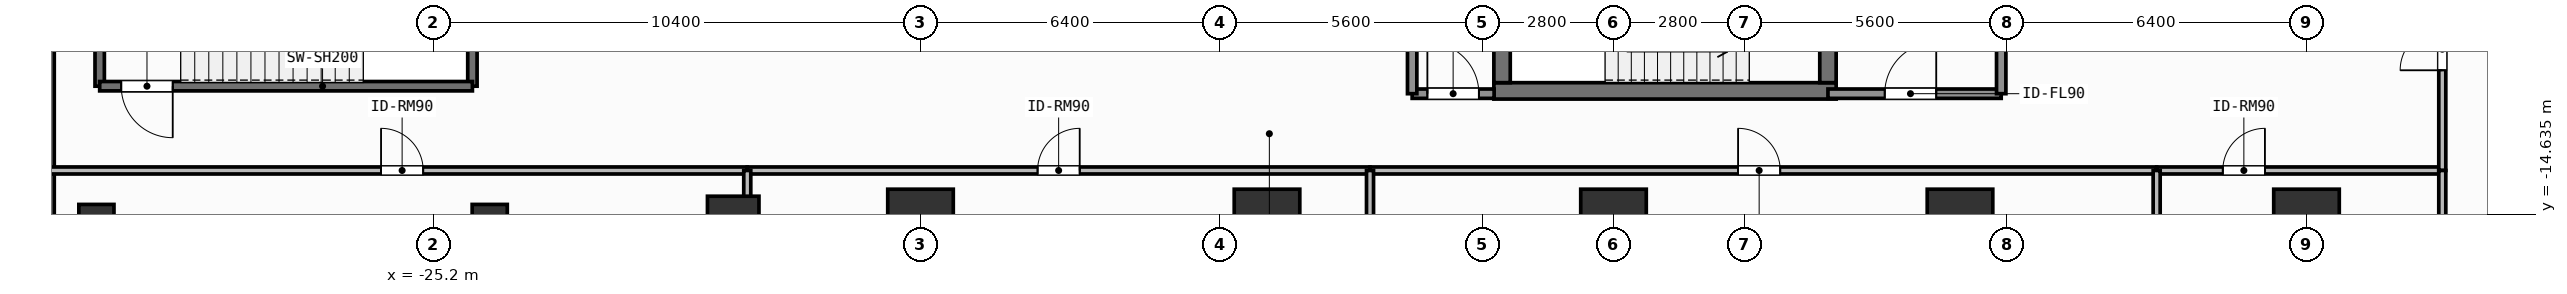
"""IFC4 building model, lengths in metres.
Left out: names, types, materials, properties, quantities, classifications, styles, units other than length and angle.
Written with IfcOpenShell. Run it as: python <this file> out.ifc"""

import sys

from ifc_helpers import new_model, si_unit, direction, frame, frame_2d, origin, origin_2d, place, context, subcontext, project, spatial, rectangle, extrude, element, fill, save


model = new_model("IFC4")
c1 = context("Model", 3, precision=1e-05, world=origin(), true_north=direction((0.0, 1.0)))
c2 = subcontext(c1, "Body", "Model", "MODEL_VIEW")
j1 = project(units=[si_unit("LENGTHUNIT", "METRE"), si_unit("PLANEANGLEUNIT", "RADIAN")], contexts=[c1])
p1 = place(None, origin())
s1 = spatial("IfcSite", under=j1, at=p1, CompositionType="ELEMENT")
p2 = place(p1, origin())
s2 = spatial("IfcBuilding", under=s1, at=p2, CompositionType="ELEMENT")
p3 = place(p2, frame((0.0, 0.0, 4.8)))
s3 = spatial("IfcBuildingStorey", under=s2, at=p3, CompositionType="ELEMENT", Elevation=4.8)
p4 = place(p3, frame((-2.555, -12.0, 0.0), z_axis=(0.0, 0.0, 1.0), x_axis=(1.0, 0.0, 0.0)))
e1 = element("IfcWall", 1, at=p4, inside=s3, PredefinedType="SHEAR", context=c2, shape_type="SweptSolid", body=[
    extrude(rectangle(XDim=7.31, YDim=0.35, at=frame_2d((3.655, 0.0))), origin(), (0.0, 0.0, 1.0), 4.2),
])
p5 = place(p3, frame((-2.38, -11.825, 0.0), z_axis=(0.0, 0.0, 1.0), x_axis=(0.0, 1.0, 0.0)))
e2 = element("IfcWall", 2, at=p5, inside=s3, PredefinedType="SHEAR", context=c2, shape_type="SweptSolid", body=[
    extrude(rectangle(XDim=2.925, YDim=0.35, at=frame_2d((1.462, 0.0))), origin(), (0.0, 0.0, 1.0), 4.2),
])
p6 = place(p3, frame((4.58, -8.9, 0.0), z_axis=(0.0, 0.0, 1.0), x_axis=(0.0, -1.0, 0.0)))
e3 = element("IfcWall", 3, at=p6, inside=s3, PredefinedType="SHEAR", context=c2, shape_type="SweptSolid", body=[
    extrude(rectangle(XDim=2.925, YDim=0.35, at=frame_2d((1.462, 0.0))), origin(), (0.0, 0.0, 1.0), 4.2),
])
p7 = place(p6, frame((0.913, 0.0, 0.0)))
e4 = element("IfcOpeningElement", 4, at=p7, cuts=e3, PredefinedType="OPENING", context=c2, shape_type="SweptSolid", body=[
    extrude(rectangle(XDim=1.1, YDim=2.15, at=frame_2d((0.55, 1.075))), frame((0.0, 0.185, 0.0), z_axis=(0.0, -1.0, 0.0), x_axis=(1.0, 0.0, 0.0)), (0.0, 0.0, 1.0), 0.37),
])
for number, where, z_axis, x_axis in (
    (5, (-14.8, -14.8, 0.0), (0.0, 0.0, 1.0), (1.0, 0.0, 0.0)),
    (6, (-7.4, -14.8, 0.0), (0.0, 0.0, 1.0), (1.0, 0.0, 0.0)),
    (7, (0.0, -14.8, 0.0), (0.0, 0.0, 1.0), (1.0, 0.0, 0.0)),
    (8, (7.4, -14.8, 0.0), (0.0, 0.0, 1.0), (1.0, 0.0, 0.0)),
    (9, (14.8, -14.8, 0.0), (0.0, 0.0, 1.0), (1.0, 0.0, 0.0)),
):
    element("IfcColumn", number, at=place(p3, frame(where, z_axis=z_axis, x_axis=x_axis)), inside=s3, PredefinedType="COLUMN", context=c2, shape_type="SweptSolid", body=[
        extrude(rectangle(XDim=1.4, YDim=1.4, at=origin_2d()), origin(), (0.0, 0.0, 1.0), 4.2),
    ])
p8 = place(p3, frame((-18.8, -14.8, 0.0), z_axis=(0.0, 0.0, 1.0), x_axis=(1.0, 0.0, 0.0)))
e10 = element("IfcColumn", 10, at=p8, inside=s3, PredefinedType="COLUMN", context=c2, shape_type="SweptSolid", body=[
    extrude(rectangle(XDim=1.1, YDim=1.1, at=origin_2d()), origin(), (0.0, 0.0, 1.0), 4.2),
])
for number, where, z_axis, x_axis in (
    (11, (-32.4, -14.8, 0.0), (0.0, 0.0, 1.0), (1.0, 0.0, 0.0)),
    (12, (-24.0, -14.8, 0.0), (0.0, 0.0, 1.0), (1.0, 0.0, 0.0)),
):
    element("IfcColumn", number, at=place(p3, frame(where, z_axis=z_axis, x_axis=x_axis)), inside=s3, PredefinedType="COLUMN", context=c2, shape_type="SweptSolid", body=[
        extrude(rectangle(XDim=0.75, YDim=0.75, at=origin_2d()), origin(), (0.0, 0.0, 1.0), 4.2),
    ])
p9 = place(p3, frame((-33.45, -20.5, 0.0), z_axis=(0.0, 0.0, 1.0), x_axis=(0.0, 1.0, 0.0)))
e13 = element("IfcWall", 13, at=p9, inside=s3, PredefinedType="SOLIDWALL", context=c2, shape_type="SweptSolid", body=[
    extrude(rectangle(XDim=14.09, YDim=0.3, at=frame_2d((7.045, 0.0))), origin(), (0.0, 0.0, 1.0), 3.96),
])
for number, where, z_axis, x_axis in (
    (14, (-32.33, -11.9, 0.0), (0.0, 0.0, 1.0), (0.0, 1.0, 0.0)),
    (15, (-24.37, -8.48, 0.0), (0.0, 0.0, 1.0), (0.0, -1.0, 0.0)),
):
    element("IfcWall", number, at=place(p3, frame(where, z_axis=z_axis, x_axis=x_axis)), inside=s3, PredefinedType="SHEAR", context=c2, shape_type="SweptSolid", body=[
        extrude(rectangle(XDim=3.42, YDim=0.2, at=frame_2d((1.71, 0.0))), origin(), (0.0, 0.0, 1.0), 3.96),
    ])
p10 = place(p3, frame((-24.37, -11.9, 0.0), z_axis=(0.0, 0.0, 1.0), x_axis=(-1.0, 0.0, 0.0)))
e16 = element("IfcWall", 16, at=p10, inside=s3, PredefinedType="SHEAR", context=c2, shape_type="SweptSolid", body=[
    extrude(rectangle(XDim=7.96, YDim=0.2, at=frame_2d((3.98, 0.0))), origin(), (0.0, 0.0, 1.0), 3.96),
])
p11 = place(p10, frame((6.4, 0.0, 0.0)))
e17 = element("IfcOpeningElement", 17, at=p11, cuts=e16, PredefinedType="OPENING", context=c2, shape_type="SweptSolid", body=[
    extrude(rectangle(XDim=1.1, YDim=2.15, at=frame_2d((0.55, 1.075))), frame((0.0, 0.11, 0.0), z_axis=(0.0, -1.0, 0.0), x_axis=(1.0, 0.0, 0.0)), (0.0, 0.0, 1.0), 0.22),
])
p12 = place(p3, frame((4.58, -12.06, 0.0), z_axis=(0.0, 0.0, 1.0), x_axis=(1.0, 0.0, 0.0)))
e18 = element("IfcWall", 18, at=p12, inside=s3, PredefinedType="SOLIDWALL", context=c2, shape_type="SweptSolid", body=[
    extrude(rectangle(XDim=3.7, YDim=0.2, at=frame_2d((1.85, 0.0))), origin(), (0.0, 0.0, 1.0), 3.96),
])
p13 = place(p12, frame((1.212, 0.0, 0.0)))
e19 = element("IfcOpeningElement", 19, at=p13, cuts=e18, PredefinedType="OPENING", context=c2, shape_type="SweptSolid", body=[
    extrude(rectangle(XDim=1.1, YDim=2.15, at=frame_2d((0.55, 1.075))), frame((0.0, 0.11, 0.0), z_axis=(0.0, -1.0, 0.0), x_axis=(1.0, 0.0, 0.0)), (0.0, 0.0, 1.0), 0.22),
])
p14 = place(p3, frame((-4.3, -12.06, 0.0), z_axis=(0.0, 0.0, 1.0), x_axis=(1.0, 0.0, 0.0)))
e20 = element("IfcWall", 20, at=p14, inside=s3, PredefinedType="SOLIDWALL", context=c2, shape_type="SweptSolid", body=[
    extrude(rectangle(XDim=1.75, YDim=0.2, at=frame_2d((0.875, 0.0))), origin(), (0.0, 0.0, 1.0), 3.96),
])
p15 = place(p14, frame((0.325, 0.0, 0.0)))
e21 = element("IfcOpeningElement", 21, at=p15, cuts=e20, PredefinedType="OPENING", context=c2, shape_type="SweptSolid", body=[
    extrude(rectangle(XDim=1.1, YDim=2.15, at=frame_2d((0.55, 1.075))), frame((0.0, 0.11, 0.0), z_axis=(0.0, -1.0, 0.0), x_axis=(1.0, 0.0, 0.0)), (0.0, 0.0, 1.0), 0.22),
])
p16 = place(p3, frame((-33.42, -13.7, 0.0), z_axis=(0.0, 0.0, 1.0), x_axis=(1.0, 0.0, 0.0)))
e22 = element("IfcWall", 22, at=p16, inside=s3, PredefinedType="PARTITIONING", context=c2, shape_type="SweptSolid", body=[
    extrude(rectangle(XDim=14.92, YDim=0.15, at=frame_2d((7.46, 0.0))), origin(), (0.0, 0.0, 1.0), 3.96),
])
p17 = place(p16, frame((7.099, 0.0, 0.0)))
e23 = element("IfcOpeningElement", 23, at=p17, cuts=e22, PredefinedType="OPENING", context=c2, shape_type="SweptSolid", body=[
    extrude(rectangle(XDim=0.9, YDim=2.1, at=frame_2d((0.45, 1.05))), frame((0.0, 0.085, 0.0), z_axis=(0.0, -1.0, 0.0), x_axis=(1.0, 0.0, 0.0)), (0.0, 0.0, 1.0), 0.17),
])
p18 = place(p3, frame((-18.5, -13.7, 0.0), z_axis=(0.0, 0.0, 1.0), x_axis=(1.0, 0.0, 0.0)))
e24 = element("IfcWall", 24, at=p18, inside=s3, PredefinedType="PARTITIONING", context=c2, shape_type="SweptSolid", body=[
    extrude(rectangle(XDim=13.3, YDim=0.15, at=frame_2d((6.65, 0.0))), origin(), (0.0, 0.0, 1.0), 3.96),
])
p19 = place(p18, frame((6.2, 0.0, 0.0)))
e25 = element("IfcOpeningElement", 25, at=p19, cuts=e24, PredefinedType="OPENING", context=c2, shape_type="SweptSolid", body=[
    extrude(rectangle(XDim=0.9, YDim=2.1, at=frame_2d((0.45, 1.05))), frame((0.0, 0.085, 0.0), z_axis=(0.0, -1.0, 0.0), x_axis=(1.0, 0.0, 0.0)), (0.0, 0.0, 1.0), 0.17),
])
p20 = place(p3, frame((-5.2, -13.7, 0.0), z_axis=(0.0, 0.0, 1.0), x_axis=(1.0, 0.0, 0.0)))
e26 = element("IfcWall", 26, at=p20, inside=s3, PredefinedType="PARTITIONING", context=c2, shape_type="SweptSolid", body=[
    extrude(rectangle(XDim=16.8, YDim=0.15, at=frame_2d((8.4, 0.0))), origin(), (0.0, 0.0, 1.0), 3.96),
])
p21 = place(p20, frame((7.861, 0.0, 0.0)))
e27 = element("IfcOpeningElement", 27, at=p21, cuts=e26, PredefinedType="OPENING", context=c2, shape_type="SweptSolid", body=[
    extrude(rectangle(XDim=0.9, YDim=2.1, at=frame_2d((0.45, 1.05))), frame((0.0, 0.085, 0.0), z_axis=(0.0, -1.0, 0.0), x_axis=(1.0, 0.0, 0.0)), (0.0, 0.0, 1.0), 0.17),
])
p22 = place(p3, frame((11.6, -13.7, 0.0), z_axis=(0.0, 0.0, 1.0), x_axis=(1.0, 0.0, 0.0)))
e28 = element("IfcWall", 28, at=p22, inside=s3, PredefinedType="PARTITIONING", context=c2, shape_type="SweptSolid", body=[
    extrude(rectangle(XDim=6.05, YDim=0.15, at=frame_2d((3.025, 0.0))), origin(), (0.0, 0.0, 1.0), 3.96),
])
p23 = place(p22, frame((1.412, 0.0, 0.0)))
e29 = element("IfcOpeningElement", 29, at=p23, cuts=e28, PredefinedType="OPENING", context=c2, shape_type="SweptSolid", body=[
    extrude(rectangle(XDim=0.9, YDim=2.1, at=frame_2d((0.45, 1.05))), frame((0.0, 0.085, 0.0), z_axis=(0.0, -1.0, 0.0), x_axis=(1.0, 0.0, 0.0)), (0.0, 0.0, 1.0), 0.17),
])
p24 = place(p3, frame((17.7, -13.7, 0.0), z_axis=(0.0, 0.0, 1.0), x_axis=(0.0, 1.0, 0.0)))
e30 = element("IfcWall", 30, at=p24, inside=s3, PredefinedType="PARTITIONING", context=c2, shape_type="SweptSolid", body=[
    extrude(rectangle(XDim=6.8, YDim=0.15, at=frame_2d((3.4, 0.0))), origin(), (0.0, 0.0, 1.0), 3.96),
])
p25 = place(p24, frame((2.14, 0.0, 0.0)))
e31 = element("IfcOpeningElement", 31, at=p25, cuts=e30, PredefinedType="OPENING", context=c2, shape_type="SweptSolid", body=[
    extrude(rectangle(XDim=0.9, YDim=2.1, at=frame_2d((0.45, 1.05))), frame((0.0, 0.085, 0.0), z_axis=(0.0, -1.0, 0.0), x_axis=(1.0, 0.0, 0.0)), (0.0, 0.0, 1.0), 0.17),
])
for number, where, z_axis, x_axis in (
    (32, (8.28, -12.06, 0.0), (0.0, 0.0, 1.0), (0.0, 1.0, 0.0)),
    (33, (-4.3, -12.06, 0.0), (0.0, 0.0, 1.0), (0.0, 1.0, 0.0)),
):
    element("IfcWall", number, at=place(p3, frame(where, z_axis=z_axis, x_axis=x_axis)), inside=s3, PredefinedType="SOLIDWALL", context=c2, shape_type="SweptSolid", body=[
        extrude(rectangle(XDim=3.11, YDim=0.2, at=frame_2d((1.555, 0.0))), origin(), (0.0, 0.0, 1.0), 3.96),
    ])
p26 = place(p3, frame((-18.5, -24.92, 0.0), z_axis=(0.0, 0.0, 1.0), x_axis=(0.0, 1.0, 0.0)))
e34 = element("IfcWall", 34, at=p26, inside=s3, PredefinedType="PARTITIONING", context=c2, shape_type="SweptSolid", body=[
    extrude(rectangle(XDim=11.22, YDim=0.15, at=frame_2d((5.61, 0.0))), origin(), (0.0, 0.0, 1.0), 3.25),
])
for number, where, z_axis, x_axis in (
    (35, (-5.2, -24.92, 0.0), (0.0, 0.0, 1.0), (0.0, 1.0, 0.0)),
    (36, (11.6, -24.92, 0.0), (0.0, 0.0, 1.0), (0.0, 1.0, 0.0)),
    (37, (17.7, -13.7, 0.0), (0.0, 0.0, 1.0), (0.0, -1.0, 0.0)),
):
    element("IfcWall", number, at=place(p3, frame(where, z_axis=z_axis, x_axis=x_axis)), inside=s3, PredefinedType="PARTITIONING", context=c2, shape_type="SweptSolid", body=[
        extrude(rectangle(XDim=11.22, YDim=0.15, at=frame_2d((5.61, 0.0))), origin(), (0.0, 0.0, 1.0), 3.96),
    ])
p27 = place(p11, origin())
e38 = element("IfcDoor", 38, at=p27, inside=s3, OperationType="SINGLE_SWING_LEFT", PredefinedType="DOOR", context=c2, shape_type="SweptSolid", body=[
    extrude(rectangle(XDim=1.1, YDim=2.15, at=frame_2d((0.55, 1.075))), frame((0.0, 0.025, 0.0), z_axis=(0.0, -1.0, 0.0), x_axis=(1.0, 0.0, 0.0)), (0.0, 0.0, 1.0), 0.05),
])
fill(e17, e38)
p28 = place(p13, origin())
e39 = element("IfcDoor", 39, at=p28, inside=s3, OperationType="SINGLE_SWING_RIGHT", PredefinedType="DOOR", context=c2, shape_type="SweptSolid", body=[
    extrude(rectangle(XDim=1.1, YDim=2.15, at=frame_2d((0.55, 1.075))), frame((0.0, 0.025, 0.0), z_axis=(0.0, -1.0, 0.0), x_axis=(1.0, 0.0, 0.0)), (0.0, 0.0, 1.0), 0.05),
])
fill(e19, e39)
p29 = place(p15, origin())
e40 = element("IfcDoor", 40, at=p29, inside=s3, OperationType="SINGLE_SWING_LEFT", PredefinedType="DOOR", context=c2, shape_type="SweptSolid", body=[
    extrude(rectangle(XDim=1.1, YDim=2.15, at=frame_2d((0.55, 1.075))), frame((0.0, 0.025, 0.0), z_axis=(0.0, -1.0, 0.0), x_axis=(1.0, 0.0, 0.0)), (0.0, 0.0, 1.0), 0.05),
])
fill(e21, e40)
p30 = place(p17, origin())
e41 = element("IfcDoor", 41, at=p30, inside=s3, OperationType="SINGLE_SWING_LEFT", PredefinedType="DOOR", context=c2, shape_type="SweptSolid", body=[
    extrude(rectangle(XDim=0.9, YDim=2.1, at=frame_2d((0.45, 1.05))), frame((0.0, 0.025, 0.0), z_axis=(0.0, -1.0, 0.0), x_axis=(1.0, 0.0, 0.0)), (0.0, 0.0, 1.0), 0.05),
])
fill(e23, e41)
p31 = place(p19, origin())
e42 = element("IfcDoor", 42, at=p31, inside=s3, OperationType="SINGLE_SWING_RIGHT", PredefinedType="DOOR", context=c2, shape_type="SweptSolid", body=[
    extrude(rectangle(XDim=0.9, YDim=2.1, at=frame_2d((0.45, 1.05))), frame((0.0, 0.025, 0.0), z_axis=(0.0, -1.0, 0.0), x_axis=(1.0, 0.0, 0.0)), (0.0, 0.0, 1.0), 0.05),
])
fill(e25, e42)
p32 = place(p21, origin())
e43 = element("IfcDoor", 43, at=p32, inside=s3, OperationType="SINGLE_SWING_LEFT", PredefinedType="DOOR", context=c2, shape_type="SweptSolid", body=[
    extrude(rectangle(XDim=0.9, YDim=2.1, at=frame_2d((0.45, 1.05))), frame((0.0, 0.025, 0.0), z_axis=(0.0, -1.0, 0.0), x_axis=(1.0, 0.0, 0.0)), (0.0, 0.0, 1.0), 0.05),
])
fill(e27, e43)
p33 = place(p23, origin())
e44 = element("IfcDoor", 44, at=p33, inside=s3, OperationType="SINGLE_SWING_RIGHT", PredefinedType="DOOR", context=c2, shape_type="SweptSolid", body=[
    extrude(rectangle(XDim=0.9, YDim=2.1, at=frame_2d((0.45, 1.05))), frame((0.0, 0.025, 0.0), z_axis=(0.0, -1.0, 0.0), x_axis=(1.0, 0.0, 0.0)), (0.0, 0.0, 1.0), 0.05),
])
fill(e29, e44)
p34 = place(p25, origin())
e45 = element("IfcDoor", 45, at=p34, inside=s3, OperationType="SINGLE_SWING_LEFT", PredefinedType="DOOR", context=c2, shape_type="SweptSolid", body=[
    extrude(rectangle(XDim=0.9, YDim=2.1, at=frame_2d((0.45, 1.05))), frame((0.0, 0.025, 0.0), z_axis=(0.0, -1.0, 0.0), x_axis=(1.0, 0.0, 0.0)), (0.0, 0.0, 1.0), 0.05),
])
fill(e31, e45)
save(model, sys.argv[1])
